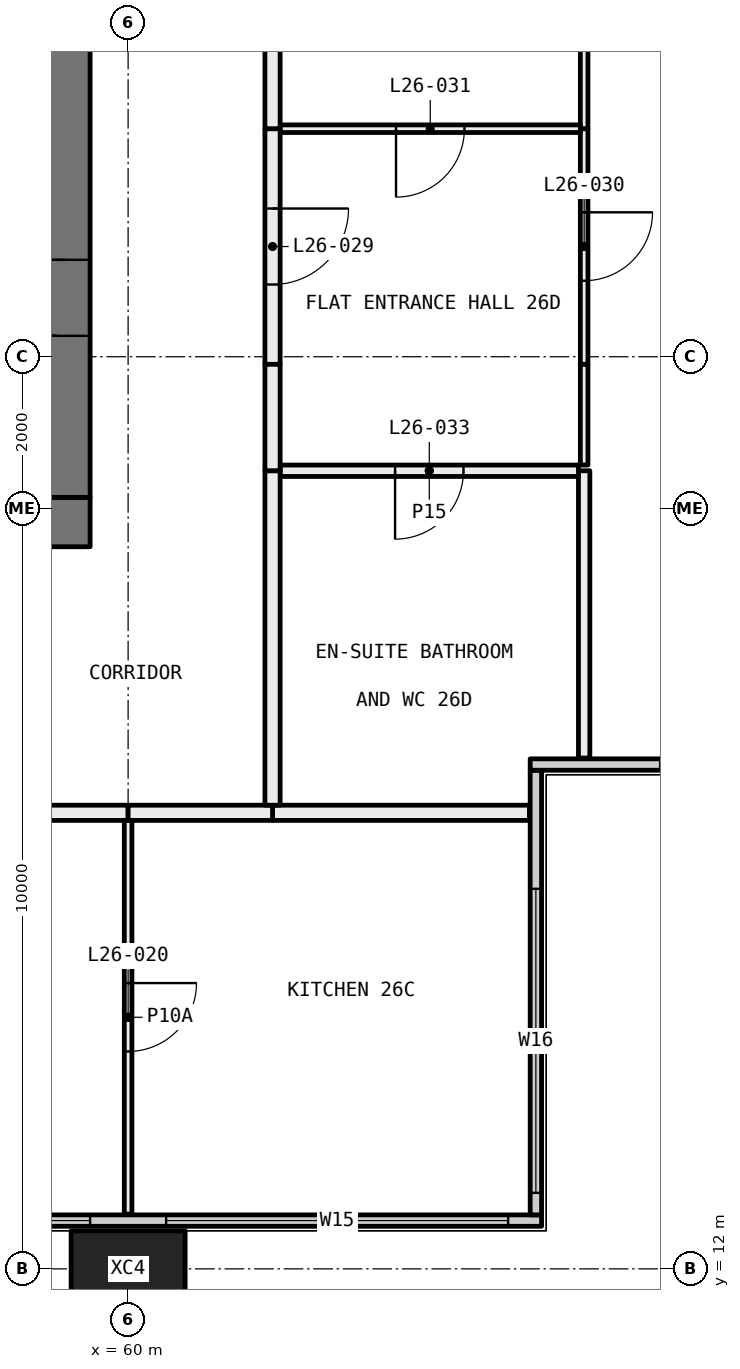
"""IFC4 building model, lengths in metres.
Left out: names, types, materials, properties, quantities, classifications, styles, units other than length and angle.
Written with IfcOpenShell. Run it as: python <this file> out.ifc"""

import sys

from ifc_helpers import new_model, si_unit, direction, frame, frame_2d, origin, origin_2d, place, context, subcontext, project, spatial, rectangle, hollow_rectangle, extrude, element, fill, save


model = new_model("IFC4")
c1 = context("Model", 3, precision=1e-05, world=origin(), true_north=direction((0.0, 1.0)))
c2 = subcontext(c1, "Body", "Model", "MODEL_VIEW")
j1 = project(units=[si_unit("LENGTHUNIT", "METRE"), si_unit("PLANEANGLEUNIT", "RADIAN")], contexts=[c1])
p1 = place(None, origin())
s1 = spatial("IfcSite", under=j1, at=p1, CompositionType="ELEMENT")
p2 = place(p1, origin())
s2 = spatial("IfcBuilding", under=s1, at=p2, CompositionType="ELEMENT")
p3 = place(p2, frame((0.0, 0.0, 103.5)))
s3 = spatial("IfcBuildingStorey", under=s2, at=p3, CompositionType="ELEMENT", Elevation=103.5)
p4 = place(p3, frame((60.0, 12.0, -0.4), z_axis=(0.0, 0.0, 1.0), x_axis=(1.0, 0.0, 0.0)))
e1 = element("IfcColumn", 1, at=p4, inside=s3, PredefinedType="COLUMN", context=c2, shape_type="SweptSolid", body=[
    extrude(hollow_rectangle(XDim=1.5, YDim=1.0, WallThickness=0.06, at=origin_2d()), origin(), (0.0, 0.0, 1.0), 3.45),
])
p5 = place(p3, frame((6.56, 12.635, 0.0), z_axis=(0.0, 0.0, 1.0), x_axis=(1.0, 0.0, 0.0)))
e2 = element("IfcWall", 2, at=p5, inside=s3, PredefinedType="ELEMENTEDWALL", context=c2, shape_type="SweptSolid", body=[
    extrude(rectangle(XDim=58.88, YDim=0.15, at=frame_2d((29.44, 0.0))), origin(), (0.0, 0.0, 1.0), 3.05),
])
p6 = place(p5, frame((0.44, 0.0, 0.45)))
e3 = element("IfcOpeningElement", 3, at=p6, cuts=e2, PredefinedType="OPENING", context=c2, shape_type="SweptSolid", body=[
    extrude(rectangle(XDim=4.5, YDim=2.55, at=frame_2d((2.25, 1.275))), frame((0.0, 0.085, 0.0), z_axis=(0.0, -1.0, 0.0), x_axis=(1.0, 0.0, 0.0)), (0.0, 0.0, 1.0), 0.17),
])
p7 = place(p5, frame((5.94, 0.0, 0.45)))
e4 = element("IfcOpeningElement", 4, at=p7, cuts=e2, PredefinedType="OPENING", context=c2, shape_type="SweptSolid", body=[
    extrude(rectangle(XDim=3.75, YDim=2.55, at=frame_2d((1.875, 1.275))), frame((0.0, 0.085, 0.0), z_axis=(0.0, -1.0, 0.0), x_axis=(1.0, 0.0, 0.0)), (0.0, 0.0, 1.0), 0.17),
])
p8 = place(p5, frame((13.19, 0.0, 0.45)))
e5 = element("IfcOpeningElement", 5, at=p8, cuts=e2, PredefinedType="OPENING", context=c2, shape_type="SweptSolid", body=[
    extrude(rectangle(XDim=3.75, YDim=2.55, at=frame_2d((1.875, 1.275))), frame((0.0, 0.085, 0.0), z_axis=(0.0, -1.0, 0.0), x_axis=(1.0, 0.0, 0.0)), (0.0, 0.0, 1.0), 0.17),
])
p9 = place(p5, frame((17.94, 0.0, 0.45)))
e6 = element("IfcOpeningElement", 6, at=p9, cuts=e2, PredefinedType="OPENING", context=c2, shape_type="SweptSolid", body=[
    extrude(rectangle(XDim=3.75, YDim=2.55, at=frame_2d((1.875, 1.275))), frame((0.0, 0.085, 0.0), z_axis=(0.0, -1.0, 0.0), x_axis=(1.0, 0.0, 0.0)), (0.0, 0.0, 1.0), 0.17),
])
p10 = place(p5, frame((25.19, 0.0, 0.45)))
e7 = element("IfcOpeningElement", 7, at=p10, cuts=e2, PredefinedType="OPENING", context=c2, shape_type="SweptSolid", body=[
    extrude(rectangle(XDim=0.75, YDim=2.55, at=frame_2d((0.375, 1.275))), frame((0.0, 0.085, 0.0), z_axis=(0.0, -1.0, 0.0), x_axis=(1.0, 0.0, 0.0)), (0.0, 0.0, 1.0), 0.17),
])
p11 = place(p5, frame((26.94, 0.0, 0.45)))
e8 = element("IfcOpeningElement", 8, at=p11, cuts=e2, PredefinedType="OPENING", context=c2, shape_type="SweptSolid", body=[
    extrude(rectangle(XDim=2.0, YDim=2.55, at=frame_2d((1.0, 1.275))), frame((0.0, 0.085, 0.0), z_axis=(0.0, -1.0, 0.0), x_axis=(1.0, 0.0, 0.0)), (0.0, 0.0, 1.0), 0.17),
])
p12 = place(p5, frame((29.94, 0.0, 0.45)))
e9 = element("IfcOpeningElement", 9, at=p12, cuts=e2, PredefinedType="OPENING", context=c2, shape_type="SweptSolid", body=[
    extrude(rectangle(XDim=3.75, YDim=2.55, at=frame_2d((1.875, 1.275))), frame((0.0, 0.085, 0.0), z_axis=(0.0, -1.0, 0.0), x_axis=(1.0, 0.0, 0.0)), (0.0, 0.0, 1.0), 0.17),
])
p13 = place(p5, frame((37.19, 0.0, 0.45)))
e10 = element("IfcOpeningElement", 10, at=p13, cuts=e2, PredefinedType="OPENING", context=c2, shape_type="SweptSolid", body=[
    extrude(rectangle(XDim=3.75, YDim=2.55, at=frame_2d((1.875, 1.275))), frame((0.0, 0.085, 0.0), z_axis=(0.0, -1.0, 0.0), x_axis=(1.0, 0.0, 0.0)), (0.0, 0.0, 1.0), 0.17),
])
p14 = place(p5, frame((41.94, 0.0, 0.45)))
e11 = element("IfcOpeningElement", 11, at=p14, cuts=e2, PredefinedType="OPENING", context=c2, shape_type="SweptSolid", body=[
    extrude(rectangle(XDim=3.75, YDim=2.55, at=frame_2d((1.875, 1.275))), frame((0.0, 0.085, 0.0), z_axis=(0.0, -1.0, 0.0), x_axis=(1.0, 0.0, 0.0)), (0.0, 0.0, 1.0), 0.17),
])
p15 = place(p5, frame((49.19, 0.0, 0.45)))
e12 = element("IfcOpeningElement", 12, at=p15, cuts=e2, PredefinedType="OPENING", context=c2, shape_type="SweptSolid", body=[
    extrude(rectangle(XDim=0.75, YDim=2.55, at=frame_2d((0.375, 1.275))), frame((0.0, 0.085, 0.0), z_axis=(0.0, -1.0, 0.0), x_axis=(1.0, 0.0, 0.0)), (0.0, 0.0, 1.0), 0.17),
])
p16 = place(p5, frame((50.94, 0.0, 0.45)))
e13 = element("IfcOpeningElement", 13, at=p16, cuts=e2, PredefinedType="OPENING", context=c2, shape_type="SweptSolid", body=[
    extrude(rectangle(XDim=2.0, YDim=2.55, at=frame_2d((1.0, 1.275))), frame((0.0, 0.085, 0.0), z_axis=(0.0, -1.0, 0.0), x_axis=(1.0, 0.0, 0.0)), (0.0, 0.0, 1.0), 0.17),
])
p17 = place(p5, frame((53.94, 0.0, 0.45)))
e14 = element("IfcOpeningElement", 14, at=p17, cuts=e2, PredefinedType="OPENING", context=c2, shape_type="SweptSolid", body=[
    extrude(rectangle(XDim=4.5, YDim=2.55, at=frame_2d((2.25, 1.275))), frame((0.0, 0.085, 0.0), z_axis=(0.0, -1.0, 0.0), x_axis=(1.0, 0.0, 0.0)), (0.0, 0.0, 1.0), 0.17),
])
p18 = place(p3, frame((65.365, 12.71, 0.0), z_axis=(0.0, 0.0, 1.0), x_axis=(0.0, 1.0, 0.0)))
e15 = element("IfcWall", 15, at=p18, inside=s3, PredefinedType="ELEMENTEDWALL", context=c2, shape_type="SweptSolid", body=[
    extrude(rectangle(XDim=5.85, YDim=0.15, at=frame_2d((2.925, 0.0))), origin(), (0.0, 0.0, 1.0), 3.05),
])
p19 = place(p18, frame((0.29, 0.0, 0.45)))
e16 = element("IfcOpeningElement", 16, at=p19, cuts=e15, PredefinedType="OPENING", context=c2, shape_type="SweptSolid", body=[
    extrude(rectangle(XDim=4.0, YDim=2.55, at=frame_2d((2.0, 1.275))), frame((0.0, 0.085, 0.0), z_axis=(0.0, -1.0, 0.0), x_axis=(1.0, 0.0, 0.0)), (0.0, 0.0, 1.0), 0.17),
])
p20 = place(p3, frame((65.29, 18.635, 0.0), z_axis=(0.0, 0.0, 1.0), x_axis=(1.0, 0.0, 0.0)))
e17 = element("IfcWall", 17, at=p20, inside=s3, PredefinedType="ELEMENTEDWALL", context=c2, shape_type="SweptSolid", body=[
    extrude(rectangle(XDim=6.15, YDim=0.15, at=frame_2d((3.075, 0.0))), origin(), (0.0, 0.0, 1.0), 3.05),
])
p21 = place(p20, frame((1.71, 0.0, 0.45)))
e18 = element("IfcOpeningElement", 18, at=p21, cuts=e17, PredefinedType="OPENING", context=c2, shape_type="SweptSolid", body=[
    extrude(rectangle(XDim=4.0, YDim=2.55, at=frame_2d((2.0, 1.275))), frame((0.0, 0.085, 0.0), z_axis=(0.0, -1.0, 0.0), x_axis=(1.0, 0.0, 0.0)), (0.0, 0.0, 1.0), 0.17),
])
p22 = place(p3, frame((60.0, 12.72, 0.0), z_axis=(0.0, 0.0, 1.0), x_axis=(0.0, 1.0, 0.0)))
e19 = element("IfcWall", 19, at=p22, inside=s3, PredefinedType="PARTITIONING", context=c2, shape_type="SweptSolid", body=[
    extrude(rectangle(XDim=5.18, YDim=0.1, at=frame_2d((2.59, 0.0))), origin(), (0.0, 0.0, 1.0), 3.05),
])
p23 = place(p22, frame((2.14, 0.0, 0.0)))
e20 = element("IfcOpeningElement", 20, at=p23, cuts=e19, PredefinedType="OPENING", context=c2, shape_type="SweptSolid", body=[
    extrude(rectangle(XDim=0.9, YDim=2.1, at=frame_2d((0.45, 1.05))), frame((0.0, 0.06, 0.0), z_axis=(0.0, -1.0, 0.0), x_axis=(1.0, 0.0, 0.0)), (0.0, 0.0, 1.0), 0.12),
])
p24 = place(p3, frame((60.0, 18.0, 0.0), z_axis=(0.0, 0.0, 1.0), x_axis=(-1.0, 0.0, 0.0)))
e21 = element("IfcWall", 21, at=p24, inside=s3, PredefinedType="PARTITIONING", context=c2, shape_type="SweptSolid", body=[
    extrude(rectangle(XDim=6.0, YDim=0.2, at=frame_2d((3.0, 0.0))), origin(), (0.0, 0.0, 1.0), 3.05),
])
p25 = place(p24, frame((2.5, 0.0, 0.0)))
e22 = element("IfcOpeningElement", 22, at=p25, cuts=e21, PredefinedType="OPENING", context=c2, shape_type="SweptSolid", body=[
    extrude(rectangle(XDim=1.0, YDim=2.1, at=frame_2d((0.5, 1.05))), frame((0.0, 0.11, 0.0), z_axis=(0.0, -1.0, 0.0), x_axis=(1.0, 0.0, 0.0)), (0.0, 0.0, 1.0), 0.22),
])
p26 = place(p3, frame((65.28, 18.0, 0.0), z_axis=(0.0, 0.0, 1.0), x_axis=(-1.0, 0.0, 0.0)))
e23 = element("IfcWall", 23, at=p26, inside=s3, PredefinedType="PARTITIONING", context=c2, shape_type="SweptSolid", body=[
    extrude(rectangle(XDim=3.38, YDim=0.2, at=frame_2d((1.69, 0.0))), origin(), (0.0, 0.0, 1.0), 3.05),
])
p27 = place(p3, frame((61.9, 18.0, 0.0), z_axis=(0.0, 0.0, 1.0), x_axis=(-1.0, 0.0, 0.0)))
e24 = element("IfcWall", 24, at=p27, inside=s3, PredefinedType="PARTITIONING", context=c2, shape_type="SweptSolid", body=[
    extrude(rectangle(XDim=1.9, YDim=0.2, at=frame_2d((0.95, 0.0))), origin(), (0.0, 0.0, 1.0), 3.05),
])
p28 = place(p3, frame((66.0, 22.5, 0.0), z_axis=(0.0, 0.0, 1.0), x_axis=(0.0, -1.0, 0.0)))
e25 = element("IfcWall", 25, at=p28, inside=s3, PredefinedType="PARTITIONING", context=c2, shape_type="SweptSolid", body=[
    extrude(rectangle(XDim=3.78, YDim=0.15, at=frame_2d((1.89, 0.0))), origin(), (0.0, 0.0, 1.0), 3.05),
])
p29 = place(p3, frame((66.0, 27.0, 0.0), z_axis=(0.0, 0.0, 1.0), x_axis=(0.0, -1.0, 0.0)))
e26 = element("IfcWall", 26, at=p29, inside=s3, PredefinedType="PARTITIONING", context=c2, shape_type="SweptSolid", body=[
    extrude(rectangle(XDim=3.1, YDim=0.1, at=frame_2d((1.55, 0.0))), origin(), (0.0, 0.0, 1.0), 2.45),
])
p30 = place(p29, frame((1.1, 0.0, 0.0)))
e27 = element("IfcOpeningElement", 27, at=p30, cuts=e26, PredefinedType="OPENING", context=c2, shape_type="SweptSolid", body=[
    extrude(rectangle(XDim=0.9, YDim=2.1, at=frame_2d((0.45, 1.05))), frame((0.0, 0.06, 0.0), z_axis=(0.0, -1.0, 0.0), x_axis=(1.0, 0.0, 0.0)), (0.0, 0.0, 1.0), 0.12),
])
p31 = place(p3, frame((66.0, 23.9, 0.0), z_axis=(0.0, 0.0, 1.0), x_axis=(0.0, -1.0, 0.0)))
e28 = element("IfcWall", 28, at=p31, inside=s3, PredefinedType="PARTITIONING", context=c2, shape_type="SweptSolid", body=[
    extrude(rectangle(XDim=1.325, YDim=0.1, at=frame_2d((0.663, 0.0))), origin(), (0.0, 0.0, 1.0), 3.05),
])
p32 = place(p3, frame((66.0, 29.95, 0.0), z_axis=(0.0, 0.0, 1.0), x_axis=(0.0, -1.0, 0.0)))
e29 = element("IfcWall", 29, at=p32, inside=s3, PredefinedType="PARTITIONING", context=c2, shape_type="SweptSolid", body=[
    extrude(rectangle(XDim=2.95, YDim=0.1, at=frame_2d((1.475, 0.0))), origin(), (0.0, 0.0, 1.0), 3.05),
])
p33 = place(p3, frame((65.925, 22.5, 0.0), z_axis=(0.0, 0.0, 1.0), x_axis=(-1.0, 0.0, 0.0)))
e30 = element("IfcWall", 30, at=p33, inside=s3, PredefinedType="PARTITIONING", context=c2, shape_type="SweptSolid", body=[
    extrude(rectangle(XDim=3.925, YDim=0.15, at=frame_2d((1.962, 0.0))), origin(), (0.0, 0.0, 1.0), 3.05),
])
p34 = place(p33, frame((1.512, 0.0, 0.0)))
e31 = element("IfcOpeningElement", 31, at=p34, cuts=e30, PredefinedType="OPENING", context=c2, shape_type="SweptSolid", body=[
    extrude(rectangle(XDim=0.9, YDim=2.1, at=frame_2d((0.45, 1.05))), frame((0.0, 0.085, 0.0), z_axis=(0.0, -1.0, 0.0), x_axis=(1.0, 0.0, 0.0)), (0.0, 0.0, 1.0), 0.17),
])
p35 = place(p3, frame((61.9, 22.5, 0.0), z_axis=(0.0, 0.0, 1.0), x_axis=(0.0, -1.0, 0.0)))
e32 = element("IfcWall", 32, at=p35, inside=s3, PredefinedType="PARTITIONING", context=c2, shape_type="SweptSolid", body=[
    extrude(rectangle(XDim=4.4, YDim=0.2, at=frame_2d((2.2, 0.0))), origin(), (0.0, 0.0, 1.0), 3.05),
])
p36 = place(p3, frame((65.95, 27.0, 0.0), z_axis=(0.0, 0.0, 1.0), x_axis=(-1.0, 0.0, 0.0)))
e33 = element("IfcWall", 33, at=p36, inside=s3, PredefinedType="PARTITIONING", context=c2, shape_type="SweptSolid", body=[
    extrude(rectangle(XDim=3.95, YDim=0.1, at=frame_2d((1.975, 0.0))), origin(), (0.0, 0.0, 1.0), 3.05),
])
p37 = place(p36, frame((1.525, 0.0, 0.0)))
e34 = element("IfcOpeningElement", 34, at=p37, cuts=e33, PredefinedType="OPENING", context=c2, shape_type="SweptSolid", body=[
    extrude(rectangle(XDim=0.9, YDim=2.1, at=frame_2d((0.45, 1.05))), frame((0.0, 0.06, 0.0), z_axis=(0.0, -1.0, 0.0), x_axis=(1.0, 0.0, 0.0)), (0.0, 0.0, 1.0), 0.12),
])
p38 = place(p3, frame((61.9, 27.0, 0.0), z_axis=(0.0, 0.0, 1.0), x_axis=(0.0, -1.0, 0.0)))
e35 = element("IfcWall", 35, at=p38, inside=s3, PredefinedType="PARTITIONING", context=c2, shape_type="SweptSolid", body=[
    extrude(rectangle(XDim=3.1, YDim=0.2, at=frame_2d((1.55, 0.0))), origin(), (0.0, 0.0, 1.0), 2.45),
])
p39 = place(p38, frame((1.05, 0.0, 0.0)))
e36 = element("IfcOpeningElement", 36, at=p39, cuts=e35, PredefinedType="OPENING", context=c2, shape_type="SweptSolid", body=[
    extrude(rectangle(XDim=1.0, YDim=2.1, at=frame_2d((0.5, 1.05))), frame((0.0, 0.11, 0.0), z_axis=(0.0, -1.0, 0.0), x_axis=(1.0, 0.0, 0.0)), (0.0, 0.0, 1.0), 0.22),
])
p40 = place(p3, frame((61.9, 23.9, 0.0), z_axis=(0.0, 0.0, 1.0), x_axis=(0.0, -1.0, 0.0)))
e37 = element("IfcWall", 37, at=p40, inside=s3, PredefinedType="PARTITIONING", context=c2, shape_type="SweptSolid", body=[
    extrude(rectangle(XDim=1.4, YDim=0.2, at=frame_2d((0.7, 0.0))), origin(), (0.0, 0.0, 1.0), 3.05),
])
p41 = place(p3, frame((61.9, 35.9, 0.0), z_axis=(0.0, 0.0, 1.0), x_axis=(0.0, -1.0, 0.0)))
e38 = element("IfcWall", 38, at=p41, inside=s3, PredefinedType="PARTITIONING", context=c2, shape_type="SweptSolid", body=[
    extrude(rectangle(XDim=8.9, YDim=0.2, at=frame_2d((4.45, 0.0))), origin(), (0.0, 0.0, 1.0), 3.05),
])
p42 = place(p3, frame((59.5, 21.825, 0.0), z_axis=(0.0, 0.0, 1.0), x_axis=(-1.0, 0.0, 0.0)))
e39 = element("IfcWall", 39, at=p42, inside=s3, PredefinedType="SHEAR", context=c2, shape_type="SweptSolid", body=[
    extrude(rectangle(XDim=11.0, YDim=0.65, at=frame_2d((5.5, 0.0))), origin(), (0.0, 0.0, 1.0), 3.05),
])
p43 = place(p3, frame((59.175, 22.15, 0.0), z_axis=(0.0, 0.0, 1.0), x_axis=(0.0, 1.0, 0.0)))
e40 = element("IfcWall", 40, at=p43, inside=s3, PredefinedType="SHEAR", context=c2, shape_type="SweptSolid", body=[
    extrude(rectangle(XDim=15.7, YDim=0.65, at=frame_2d((7.85, 0.0))), origin(), (0.0, 0.0, 1.0), 3.05),
])
p44 = place(p43, frame((8.3, 0.0, 0.0)))
e41 = element("IfcOpeningElement", 41, at=p44, cuts=e40, PredefinedType="OPENING", context=c2, shape_type="SweptSolid", body=[
    extrude(rectangle(XDim=1.6, YDim=2.1, at=frame_2d((0.8, 1.05))), frame((0.0, 0.335, 0.0), z_axis=(0.0, -1.0, 0.0), x_axis=(1.0, 0.0, 0.0)), (0.0, 0.0, 1.0), 0.67),
])
p45 = place(p43, frame((2.125, 0.0, 0.0)))
e42 = element("IfcOpeningElement", 42, at=p45, cuts=e40, PredefinedType="OPENING", context=c2, shape_type="SweptSolid", body=[
    extrude(rectangle(XDim=1.0, YDim=2.1, at=frame_2d((0.5, 1.05))), frame((0.0, 0.335, 0.0), z_axis=(0.0, -1.0, 0.0), x_axis=(1.0, 0.0, 0.0)), (0.0, 0.0, 1.0), 0.67),
])
p46 = place(p16, origin())
e43 = element("IfcWindow", 43, at=p46, inside=s3, PartitioningType="SINGLE_PANEL", PredefinedType="WINDOW", context=c2, shape_type="SweptSolid", body=[
    extrude(rectangle(XDim=2.0, YDim=2.55, at=frame_2d((1.0, 1.275))), frame((0.0, 0.03, 0.0), z_axis=(0.0, -1.0, 0.0), x_axis=(1.0, 0.0, 0.0)), (0.0, 0.0, 1.0), 0.06),
])
fill(e13, e43)
p47 = place(p17, origin())
e44 = element("IfcWindow", 44, at=p47, inside=s3, PartitioningType="SINGLE_PANEL", PredefinedType="WINDOW", context=c2, shape_type="SweptSolid", body=[
    extrude(rectangle(XDim=4.5, YDim=2.55, at=frame_2d((2.25, 1.275))), frame((0.0, 0.03, 0.0), z_axis=(0.0, -1.0, 0.0), x_axis=(1.0, 0.0, 0.0)), (0.0, 0.0, 1.0), 0.06),
])
fill(e14, e44)
p48 = place(p19, origin())
e45 = element("IfcWindow", 45, at=p48, inside=s3, PartitioningType="SINGLE_PANEL", PredefinedType="WINDOW", context=c2, shape_type="SweptSolid", body=[
    extrude(rectangle(XDim=4.0, YDim=2.55, at=frame_2d((2.0, 1.275))), frame((0.0, 0.03, 0.0), z_axis=(0.0, -1.0, 0.0), x_axis=(1.0, 0.0, 0.0)), (0.0, 0.0, 1.0), 0.06),
])
fill(e16, e45)
p49 = place(p23, frame((0.9, 0.0, 0.0), x_axis=(-1.0, 0.0, 0.0)))
e46 = element("IfcDoor", 46, at=p49, inside=s3, OperationType="SINGLE_SWING_RIGHT", PredefinedType="DOOR", context=c2, shape_type="SweptSolid", body=[
    extrude(rectangle(XDim=0.9, YDim=2.1, at=frame_2d((0.45, 1.05))), frame((0.0, 0.025, 0.0), z_axis=(0.0, -1.0, 0.0), x_axis=(1.0, 0.0, 0.0)), (0.0, 0.0, 1.0), 0.05),
])
fill(e20, e46)
p50 = place(p39, origin())
e47 = element("IfcDoor", 47, at=p50, inside=s3, OperationType="SINGLE_SWING_RIGHT", PredefinedType="DOOR", context=c2, shape_type="SweptSolid", body=[
    extrude(rectangle(XDim=1.0, YDim=2.1, at=frame_2d((0.5, 1.05))), frame((0.0, 0.025, 0.0), z_axis=(0.0, -1.0, 0.0), x_axis=(1.0, 0.0, 0.0)), (0.0, 0.0, 1.0), 0.05),
])
fill(e36, e47)
p51 = place(p30, origin())
e48 = element("IfcDoor", 48, at=p51, inside=s3, OperationType="SINGLE_SWING_RIGHT", PredefinedType="DOOR", context=c2, shape_type="SweptSolid", body=[
    extrude(rectangle(XDim=0.9, YDim=2.1, at=frame_2d((0.45, 1.05))), frame((0.0, 0.025, 0.0), z_axis=(0.0, -1.0, 0.0), x_axis=(1.0, 0.0, 0.0)), (0.0, 0.0, 1.0), 0.05),
])
fill(e27, e48)
p52 = place(p37, origin())
e49 = element("IfcDoor", 49, at=p52, inside=s3, OperationType="SINGLE_SWING_LEFT", PredefinedType="DOOR", context=c2, shape_type="SweptSolid", body=[
    extrude(rectangle(XDim=0.9, YDim=2.1, at=frame_2d((0.45, 1.05))), frame((0.0, 0.025, 0.0), z_axis=(0.0, -1.0, 0.0), x_axis=(1.0, 0.0, 0.0)), (0.0, 0.0, 1.0), 0.05),
])
fill(e34, e49)
p53 = place(p34, origin())
e50 = element("IfcDoor", 50, at=p53, inside=s3, OperationType="SINGLE_SWING_LEFT", PredefinedType="DOOR", context=c2, shape_type="SweptSolid", body=[
    extrude(rectangle(XDim=0.9, YDim=2.1, at=frame_2d((0.45, 1.05))), frame((0.0, 0.025, 0.0), z_axis=(0.0, -1.0, 0.0), x_axis=(1.0, 0.0, 0.0)), (0.0, 0.0, 1.0), 0.05),
])
fill(e31, e50)
p54 = place(p45, origin())
e51 = element("IfcDoor", 51, at=p54, inside=s3, OperationType="SINGLE_SWING_LEFT", PredefinedType="DOOR", context=c2, shape_type="SweptSolid", body=[
    extrude(rectangle(XDim=1.0, YDim=2.1, at=frame_2d((0.5, 1.05))), frame((0.0, 0.025, 0.0), z_axis=(0.0, -1.0, 0.0), x_axis=(1.0, 0.0, 0.0)), (0.0, 0.0, 1.0), 0.05),
])
fill(e42, e51)
save(model, sys.argv[1])
